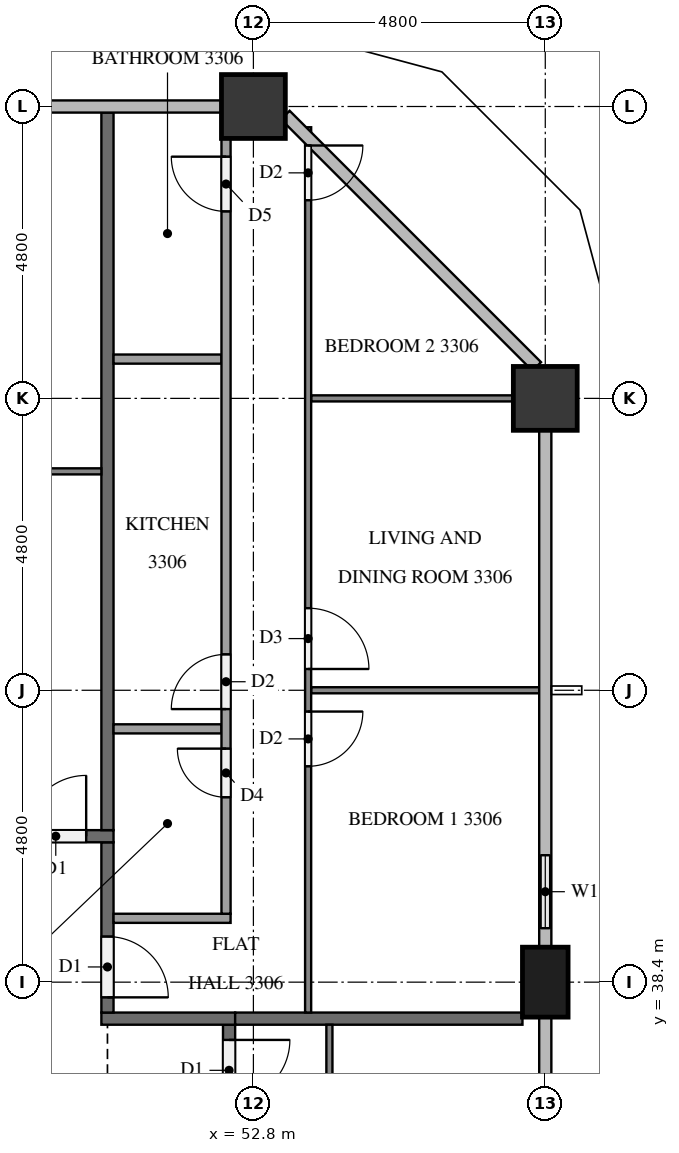
"""IFC4 building model, lengths in metres.
Left out: names, types, materials, properties, quantities, classifications, styles, units other than length and angle.
Written with IfcOpenShell. Run it as: python <this file> out.ifc"""

import sys

from ifc_helpers import new_model, si_unit, direction, frame, frame_2d, origin, origin_2d, place, context, subcontext, project, spatial, rectangle, extrude, element, fill, save


model = new_model("IFC4")
c1 = context("Model", 3, precision=1e-05, world=origin(), true_north=direction((0.0, 1.0)))
c2 = subcontext(c1, "Body", "Model", "MODEL_VIEW")
j1 = project(units=[si_unit("LENGTHUNIT", "METRE"), si_unit("PLANEANGLEUNIT", "RADIAN")], contexts=[c1])
p1 = place(None, origin())
s1 = spatial("IfcSite", under=j1, at=p1, CompositionType="ELEMENT")
p2 = place(p1, origin())
s2 = spatial("IfcBuilding", under=s1, at=p2, CompositionType="ELEMENT")
p3 = place(p2, frame((0.0, 0.0, 129.6)))
s3 = spatial("IfcBuildingStorey", under=s2, at=p3, CompositionType="ELEMENT", Elevation=129.6)
p4 = place(p3, frame((57.6, 38.4, 0.0), z_axis=(0.0, 0.0, 1.0), x_axis=(0.0, 1.0, 0.0)))
e1 = element("IfcColumn", 1, at=p4, inside=s3, PredefinedType="COLUMN", context=c2, shape_type="SweptSolid", body=[
    extrude(rectangle(XDim=1.15, YDim=0.75, at=origin_2d()), origin(), (0.0, 0.0, 1.0), 3.2),
])
for number, where, z_axis, x_axis in (
    (2, (57.6, 48.0, 0.0), (0.0, 0.0, 1.0), (1.0, 0.0, 0.0)),
    (3, (52.8, 52.8, 0.0), (0.0, 0.0, 1.0), (1.0, 0.0, 0.0)),
):
    element("IfcColumn", number, at=place(p3, frame(where, z_axis=z_axis, x_axis=x_axis)), inside=s3, PredefinedType="COLUMN", context=c2, shape_type="SweptSolid", body=[
        extrude(rectangle(XDim=1.05, YDim=1.05, at=origin_2d()), origin(), (0.0, 0.0, 1.0), 3.2),
    ])
p5 = place(p3, frame((57.6, 38.975, 0.0), z_axis=(0.0, 0.0, 1.0), x_axis=(0.0, 1.0, 0.0)))
e4 = element("IfcWall", 4, at=p5, inside=s3, PredefinedType="SOLIDWALL", context=c2, shape_type="SweptSolid", body=[
    extrude(rectangle(XDim=1.825, YDim=0.15, at=frame_2d((0.913, 0.0))), origin(), (0.0, 0.0, 1.0), 3.2),
])
p6 = place(p5, frame((0.312, 0.0, 0.9)))
e5 = element("IfcOpeningElement", 5, at=p6, cuts=e4, PredefinedType="OPENING", context=c2, shape_type="SweptSolid", body=[
    extrude(rectangle(XDim=1.2, YDim=1.4, at=frame_2d((0.6, 0.7))), frame((0.0, 0.085, 0.0), z_axis=(0.0, -1.0, 0.0), x_axis=(1.0, 0.0, 0.0)), (0.0, 0.0, 1.0), 0.17),
])
p7 = place(p3, frame((52.4, 37.7, 0.0), z_axis=(0.0, 0.0, 1.0), x_axis=(0.0, -1.0, 0.0)))
e6 = element("IfcWall", 6, at=p7, inside=s3, PredefinedType="PARTITIONING", context=c2, shape_type="SweptSolid", body=[
    extrude(rectangle(XDim=22.6, YDim=0.2, at=frame_2d((11.3, 0.0))), origin(), (0.0, 0.0, 1.0), 3.2),
])
p8 = place(p7, frame((0.25, 0.0, 0.0)))
e7 = element("IfcOpeningElement", 7, at=p8, cuts=e6, PredefinedType="OPENING", context=c2, shape_type="SweptSolid", body=[
    extrude(rectangle(XDim=1.0, YDim=2.1, at=frame_2d((0.5, 1.05))), frame((0.0, 0.11, 0.0), z_axis=(0.0, -1.0, 0.0), x_axis=(1.0, 0.0, 0.0)), (0.0, 0.0, 1.0), 0.22),
])
p9 = place(p3, frame((52.5, 37.8, 0.0), z_axis=(0.0, 0.0, 1.0), x_axis=(-1.0, 0.0, 0.0)))
e8 = element("IfcWall", 8, at=p9, inside=s3, PredefinedType="PARTITIONING", context=c2, shape_type="SweptSolid", body=[
    extrude(rectangle(XDim=2.2, YDim=0.2, at=frame_2d((1.1, 0.0))), origin(), (0.0, 0.0, 1.0), 3.2),
])
p10 = place(p3, frame((50.4, 40.7, 0.0), z_axis=(0.0, 0.0, 1.0), x_axis=(0.0, -1.0, 0.0)))
e9 = element("IfcWall", 9, at=p10, inside=s3, PredefinedType="PARTITIONING", context=c2, shape_type="SweptSolid", body=[
    extrude(rectangle(XDim=2.8, YDim=0.2, at=frame_2d((1.4, 0.0))), origin(), (0.0, 0.0, 1.0), 3.2),
])
p11 = place(p10, frame((1.55, 0.0, 0.0)))
e10 = element("IfcOpeningElement", 10, at=p11, cuts=e9, PredefinedType="OPENING", context=c2, shape_type="SweptSolid", body=[
    extrude(rectangle(XDim=1.0, YDim=2.1, at=frame_2d((0.5, 1.05))), frame((0.0, 0.11, 0.0), z_axis=(0.0, -1.0, 0.0), x_axis=(1.0, 0.0, 0.0)), (0.0, 0.0, 1.0), 0.22),
])
p12 = place(p3, frame((11.9, 40.8, 0.0), z_axis=(0.0, 0.0, 1.0), x_axis=(1.0, 0.0, 0.0)))
e11 = element("IfcWall", 11, at=p12, inside=s3, PredefinedType="PARTITIONING", context=c2, shape_type="SweptSolid", body=[
    extrude(rectangle(XDim=38.6, YDim=0.2, at=frame_2d((19.3, 0.0))), origin(), (0.0, 0.0, 1.0), 3.2),
])
p13 = place(p12, frame((37.15, 0.0, 0.0)))
e12 = element("IfcOpeningElement", 12, at=p13, cuts=e11, PredefinedType="OPENING", context=c2, shape_type="SweptSolid", body=[
    extrude(rectangle(XDim=1.0, YDim=2.1, at=frame_2d((0.5, 1.05))), frame((0.0, 0.11, 0.0), z_axis=(0.0, -1.0, 0.0), x_axis=(1.0, 0.0, 0.0)), (0.0, 0.0, 1.0), 0.22),
])
p14 = place(p12, frame((10.05, 0.0, 0.0)))
e13 = element("IfcOpeningElement", 13, at=p14, cuts=e11, PredefinedType="OPENING", context=c2, shape_type="SweptSolid", body=[
    extrude(rectangle(XDim=1.0, YDim=2.1, at=frame_2d((0.5, 1.05))), frame((0.0, 0.11, 0.0), z_axis=(0.0, -1.0, 0.0), x_axis=(1.0, 0.0, 0.0)), (0.0, 0.0, 1.0), 0.22),
])
p15 = place(p12, frame((0.45, 0.0, 0.0)))
e14 = element("IfcOpeningElement", 14, at=p15, cuts=e11, PredefinedType="OPENING", context=c2, shape_type="SweptSolid", body=[
    extrude(rectangle(XDim=1.0, YDim=2.1, at=frame_2d((0.5, 1.05))), frame((0.0, 0.11, 0.0), z_axis=(0.0, -1.0, 0.0), x_axis=(1.0, 0.0, 0.0)), (0.0, 0.0, 1.0), 0.22),
])
p16 = place(p3, frame((52.5, 37.8, 0.0), z_axis=(0.0, 0.0, 1.0), x_axis=(1.0, 0.0, 0.0)))
e15 = element("IfcWall", 15, at=p16, inside=s3, PredefinedType="PARTITIONING", context=c2, shape_type="SweptSolid", body=[
    extrude(rectangle(XDim=4.725, YDim=0.2, at=frame_2d((2.363, 0.0))), origin(), (0.0, 0.0, 1.0), 3.2),
])
p17 = place(p3, frame((50.4, 40.9, 0.0), z_axis=(0.0, 0.0, 1.0), x_axis=(0.0, 1.0, 0.0)))
e16 = element("IfcWall", 16, at=p17, inside=s3, PredefinedType="PARTITIONING", context=c2, shape_type="SweptSolid", body=[
    extrude(rectangle(XDim=11.8, YDim=0.2, at=frame_2d((5.9, 0.0))), origin(), (0.0, 0.0, 1.0), 3.2),
])
p18 = place(p3, frame((54.05, 37.7, 0.0), z_axis=(0.0, 0.0, 1.0), x_axis=(0.0, -1.0, 0.0)))
e17 = element("IfcWall", 17, at=p18, inside=s3, PredefinedType="PARTITIONING", context=c2, shape_type="SweptSolid", body=[
    extrude(rectangle(XDim=22.6, YDim=0.1, at=frame_2d((11.3, 0.0))), origin(), (0.0, 0.0, 1.0), 3.2),
])
p19 = place(p18, frame((2.85, 0.0, 0.0)))
e18 = element("IfcOpeningElement", 18, at=p19, cuts=e17, PredefinedType="OPENING", context=c2, shape_type="SweptSolid", body=[
    extrude(rectangle(XDim=0.9, YDim=2.1, at=frame_2d((0.45, 1.05))), frame((0.0, 0.06, 0.0), z_axis=(0.0, -1.0, 0.0), x_axis=(1.0, 0.0, 0.0)), (0.0, 0.0, 1.0), 0.12),
])
p20 = place(p18, frame((4.45, 0.0, 0.0)))
e19 = element("IfcOpeningElement", 19, at=p20, cuts=e17, PredefinedType="OPENING", context=c2, shape_type="SweptSolid", body=[
    extrude(rectangle(XDim=0.8, YDim=2.1, at=frame_2d((0.4, 1.05))), frame((0.0, 0.06, 0.0), z_axis=(0.0, -1.0, 0.0), x_axis=(1.0, 0.0, 0.0)), (0.0, 0.0, 1.0), 0.12),
])
p21 = place(p18, frame((10.05, 0.0, 0.0)))
e20 = element("IfcOpeningElement", 20, at=p21, cuts=e17, PredefinedType="OPENING", context=c2, shape_type="SweptSolid", body=[
    extrude(rectangle(XDim=0.9, YDim=2.1, at=frame_2d((0.45, 1.05))), frame((0.0, 0.06, 0.0), z_axis=(0.0, -1.0, 0.0), x_axis=(1.0, 0.0, 0.0)), (0.0, 0.0, 1.0), 0.12),
])
p22 = place(p18, frame((11.65, 0.0, 0.0)))
e21 = element("IfcOpeningElement", 21, at=p22, cuts=e17, PredefinedType="OPENING", context=c2, shape_type="SweptSolid", body=[
    extrude(rectangle(XDim=0.9, YDim=2.1, at=frame_2d((0.45, 1.05))), frame((0.0, 0.06, 0.0), z_axis=(0.0, -1.0, 0.0), x_axis=(1.0, 0.0, 0.0)), (0.0, 0.0, 1.0), 0.12),
])
p23 = place(p18, frame((19.55, 0.0, 0.0)))
e22 = element("IfcOpeningElement", 22, at=p23, cuts=e17, PredefinedType="OPENING", context=c2, shape_type="SweptSolid", body=[
    extrude(rectangle(XDim=1.0, YDim=2.1, at=frame_2d((0.5, 1.05))), frame((0.0, 0.06, 0.0), z_axis=(0.0, -1.0, 0.0), x_axis=(1.0, 0.0, 0.0)), (0.0, 0.0, 1.0), 0.12),
])
p24 = place(p18, frame((21.25, 0.0, 0.0)))
e23 = element("IfcOpeningElement", 23, at=p24, cuts=e17, PredefinedType="OPENING", context=c2, shape_type="SweptSolid", body=[
    extrude(rectangle(XDim=0.9, YDim=2.1, at=frame_2d((0.45, 1.05))), frame((0.0, 0.06, 0.0), z_axis=(0.0, -1.0, 0.0), x_axis=(1.0, 0.0, 0.0)), (0.0, 0.0, 1.0), 0.12),
])
p25 = place(p3, frame((53.75, 43.2, 0.0), z_axis=(0.0, 0.0, 1.0), x_axis=(1.0, 0.0, 0.0)))
e24 = element("IfcWall", 24, at=p25, inside=s3, PredefinedType="PARTITIONING", context=c2, shape_type="SweptSolid", body=[
    extrude(rectangle(XDim=3.75, YDim=0.1, at=frame_2d((1.875, 0.0))), origin(), (0.0, 0.0, 1.0), 3.2),
])
p26 = place(p3, frame((53.75, 48.0, 0.0), z_axis=(0.0, 0.0, 1.0), x_axis=(1.0, 0.0, 0.0)))
e25 = element("IfcWall", 25, at=p26, inside=s3, PredefinedType="PARTITIONING", context=c2, shape_type="SweptSolid", body=[
    extrude(rectangle(XDim=3.325, YDim=0.1, at=frame_2d((1.663, 0.0))), origin(), (0.0, 0.0, 1.0), 3.2),
])
p27 = place(p3, frame((53.7, 52.459, 0.0), z_axis=(0.0, 0.0, 1.0), x_axis=(0.0, -1.0, 0.0)))
e26 = element("IfcWall", 26, at=p27, inside=s3, PredefinedType="PARTITIONING", context=c2, shape_type="SweptSolid", body=[
    extrude(rectangle(XDim=14.559, YDim=0.1, at=frame_2d((7.279, 0.0))), origin(), (0.0, 0.0, 1.0), 3.2),
])
p28 = place(p27, frame((9.609, 0.0, 0.0)))
e27 = element("IfcOpeningElement", 27, at=p28, cuts=e26, PredefinedType="OPENING", context=c2, shape_type="SweptSolid", body=[
    extrude(rectangle(XDim=0.9, YDim=2.1, at=frame_2d((0.45, 1.05))), frame((0.0, 0.06, 0.0), z_axis=(0.0, -1.0, 0.0), x_axis=(1.0, 0.0, 0.0)), (0.0, 0.0, 1.0), 0.12),
])
p29 = place(p27, frame((7.909, 0.0, 0.0)))
e28 = element("IfcOpeningElement", 28, at=p29, cuts=e26, PredefinedType="OPENING", context=c2, shape_type="SweptSolid", body=[
    extrude(rectangle(XDim=1.0, YDim=2.1, at=frame_2d((0.5, 1.05))), frame((0.0, 0.06, 0.0), z_axis=(0.0, -1.0, 0.0), x_axis=(1.0, 0.0, 0.0)), (0.0, 0.0, 1.0), 0.12),
])
p30 = place(p27, frame((0.3, 0.0, 0.0)))
e29 = element("IfcOpeningElement", 29, at=p30, cuts=e26, PredefinedType="OPENING", context=c2, shape_type="SweptSolid", body=[
    extrude(rectangle(XDim=0.9, YDim=2.1, at=frame_2d((0.45, 1.05))), frame((0.0, 0.06, 0.0), z_axis=(0.0, -1.0, 0.0), x_axis=(1.0, 0.0, 0.0)), (0.0, 0.0, 1.0), 0.12),
])
for number, where, z_axis, x_axis in (
    (30, (50.5, 42.565, 0.0), (0.0, 0.0, 1.0), (1.0, 0.0, 0.0)),
    (31, (50.5, 48.646, 0.0), (0.0, 0.0, 1.0), (1.0, 0.0, 0.0)),
):
    element("IfcWall", number, at=place(p3, frame(where, z_axis=z_axis, x_axis=x_axis)), inside=s3, PredefinedType="PARTITIONING", context=c2, shape_type="SweptSolid", body=[
        extrude(rectangle(XDim=1.775, YDim=0.15, at=frame_2d((0.887, 0.0))), origin(), (0.0, 0.0, 1.0), 3.2),
    ])
p31 = place(p3, frame((50.5, 39.45, 0.0), z_axis=(0.0, 0.0, 1.0), x_axis=(1.0, 0.0, 0.0)))
e32 = element("IfcWall", 32, at=p31, inside=s3, PredefinedType="PARTITIONING", context=c2, shape_type="SweptSolid", body=[
    extrude(rectangle(XDim=1.925, YDim=0.15, at=frame_2d((0.962, 0.0))), origin(), (0.0, 0.0, 1.0), 3.2),
])
p32 = place(p3, frame((52.35, 39.525, 0.0), z_axis=(0.0, 0.0, 1.0), x_axis=(0.0, 1.0, 0.0)))
e33 = element("IfcWall", 33, at=p32, inside=s3, PredefinedType="PARTITIONING", context=c2, shape_type="SweptSolid", body=[
    extrude(rectangle(XDim=12.75, YDim=0.15, at=frame_2d((6.375, 0.0))), origin(), (0.0, 0.0, 1.0), 3.2),
])
p33 = place(p32, frame((1.915, 0.0, 0.0)))
e34 = element("IfcOpeningElement", 34, at=p33, cuts=e33, PredefinedType="OPENING", context=c2, shape_type="SweptSolid", body=[
    extrude(rectangle(XDim=0.8, YDim=2.1, at=frame_2d((0.4, 1.05))), frame((0.0, 0.085, 0.0), z_axis=(0.0, -1.0, 0.0), x_axis=(1.0, 0.0, 0.0)), (0.0, 0.0, 1.0), 0.17),
])
p34 = place(p32, frame((3.365, 0.0, 0.0)))
e35 = element("IfcOpeningElement", 35, at=p34, cuts=e33, PredefinedType="OPENING", context=c2, shape_type="SweptSolid", body=[
    extrude(rectangle(XDim=0.9, YDim=2.1, at=frame_2d((0.45, 1.05))), frame((0.0, 0.085, 0.0), z_axis=(0.0, -1.0, 0.0), x_axis=(1.0, 0.0, 0.0)), (0.0, 0.0, 1.0), 0.17),
])
p35 = place(p32, frame((11.55, 0.0, 0.0)))
e36 = element("IfcOpeningElement", 36, at=p35, cuts=e33, PredefinedType="OPENING", context=c2, shape_type="SweptSolid", body=[
    extrude(rectangle(XDim=0.9, YDim=2.1, at=frame_2d((0.45, 1.05))), frame((0.0, 0.085, 0.0), z_axis=(0.0, -1.0, 0.0), x_axis=(1.0, 0.0, 0.0)), (0.0, 0.0, 1.0), 0.17),
])
p36 = place(p3, frame((36.1, 46.8, 0.0), z_axis=(0.0, 0.0, 1.0), x_axis=(1.0, 0.0, 0.0)))
e37 = element("IfcWall", 37, at=p36, inside=s3, PredefinedType="PARTITIONING", context=c2, shape_type="SweptSolid", body=[
    extrude(rectangle(XDim=14.2, YDim=0.1, at=frame_2d((7.1, 0.0))), origin(), (0.0, 0.0, 1.0), 3.2),
])
p37 = place(p36, frame((9.85, 0.0, 0.0)))
e38 = element("IfcOpeningElement", 38, at=p37, cuts=e37, PredefinedType="OPENING", context=c2, shape_type="SweptSolid", body=[
    extrude(rectangle(XDim=0.9, YDim=2.1, at=frame_2d((0.45, 1.05))), frame((0.0, 0.06, 0.0), z_axis=(0.0, -1.0, 0.0), x_axis=(1.0, 0.0, 0.0)), (0.0, 0.0, 1.0), 0.12),
])
p38 = place(p36, frame((8.15, 0.0, 0.0)))
e39 = element("IfcOpeningElement", 39, at=p38, cuts=e37, PredefinedType="OPENING", context=c2, shape_type="SweptSolid", body=[
    extrude(rectangle(XDim=1.0, YDim=2.1, at=frame_2d((0.5, 1.05))), frame((0.0, 0.06, 0.0), z_axis=(0.0, -1.0, 0.0), x_axis=(1.0, 0.0, 0.0)), (0.0, 0.0, 1.0), 0.12),
])
p39 = place(p36, frame((0.3, 0.0, 0.0)))
e40 = element("IfcOpeningElement", 40, at=p39, cuts=e37, PredefinedType="OPENING", context=c2, shape_type="SweptSolid", body=[
    extrude(rectangle(XDim=0.9, YDim=2.1, at=frame_2d((0.45, 1.05))), frame((0.0, 0.06, 0.0), z_axis=(0.0, -1.0, 0.0), x_axis=(1.0, 0.0, 0.0)), (0.0, 0.0, 1.0), 0.12),
])
p40 = place(p6, origin())
e41 = element("IfcWindow", 41, at=p40, inside=s3, PartitioningType="SINGLE_PANEL", PredefinedType="WINDOW", context=c2, shape_type="SweptSolid", body=[
    extrude(rectangle(XDim=1.2, YDim=1.4, at=frame_2d((0.6, 0.7))), frame((0.0, 0.03, 0.0), z_axis=(0.0, -1.0, 0.0), x_axis=(1.0, 0.0, 0.0)), (0.0, 0.0, 1.0), 0.06),
])
fill(e5, e41)
p41 = place(p8, origin())
e42 = element("IfcDoor", 42, at=p41, inside=s3, OperationType="SINGLE_SWING_LEFT", PredefinedType="DOOR", context=c2, shape_type="SweptSolid", body=[
    extrude(rectangle(XDim=1.0, YDim=2.1, at=frame_2d((0.5, 1.05))), frame((0.0, 0.025, 0.0), z_axis=(0.0, -1.0, 0.0), x_axis=(1.0, 0.0, 0.0)), (0.0, 0.0, 1.0), 0.05),
])
fill(e7, e42)
p42 = place(p11, origin())
e43 = element("IfcDoor", 43, at=p42, inside=s3, OperationType="SINGLE_SWING_RIGHT", PredefinedType="DOOR", context=c2, shape_type="SweptSolid", body=[
    extrude(rectangle(XDim=1.0, YDim=2.1, at=frame_2d((0.5, 1.05))), frame((0.0, 0.025, 0.0), z_axis=(0.0, -1.0, 0.0), x_axis=(1.0, 0.0, 0.0)), (0.0, 0.0, 1.0), 0.05),
])
fill(e10, e43)
p43 = place(p13, origin())
e44 = element("IfcDoor", 44, at=p43, inside=s3, OperationType="SINGLE_SWING_RIGHT", PredefinedType="DOOR", context=c2, shape_type="SweptSolid", body=[
    extrude(rectangle(XDim=1.0, YDim=2.1, at=frame_2d((0.5, 1.05))), frame((0.0, 0.025, 0.0), z_axis=(0.0, -1.0, 0.0), x_axis=(1.0, 0.0, 0.0)), (0.0, 0.0, 1.0), 0.05),
])
fill(e12, e44)
p44 = place(p28, origin())
e45 = element("IfcDoor", 45, at=p44, inside=s3, OperationType="SINGLE_SWING_LEFT", PredefinedType="DOOR", context=c2, shape_type="SweptSolid", body=[
    extrude(rectangle(XDim=0.9, YDim=2.1, at=frame_2d((0.45, 1.05))), frame((0.0, 0.025, 0.0), z_axis=(0.0, -1.0, 0.0), x_axis=(1.0, 0.0, 0.0)), (0.0, 0.0, 1.0), 0.05),
])
fill(e27, e45)
p45 = place(p29, origin())
e46 = element("IfcDoor", 46, at=p45, inside=s3, OperationType="SINGLE_SWING_RIGHT", PredefinedType="DOOR", context=c2, shape_type="SweptSolid", body=[
    extrude(rectangle(XDim=1.0, YDim=2.1, at=frame_2d((0.5, 1.05))), frame((0.0, 0.025, 0.0), z_axis=(0.0, -1.0, 0.0), x_axis=(1.0, 0.0, 0.0)), (0.0, 0.0, 1.0), 0.05),
])
fill(e28, e46)
p46 = place(p30, origin())
e47 = element("IfcDoor", 47, at=p46, inside=s3, OperationType="SINGLE_SWING_LEFT", PredefinedType="DOOR", context=c2, shape_type="SweptSolid", body=[
    extrude(rectangle(XDim=0.9, YDim=2.1, at=frame_2d((0.45, 1.05))), frame((0.0, 0.025, 0.0), z_axis=(0.0, -1.0, 0.0), x_axis=(1.0, 0.0, 0.0)), (0.0, 0.0, 1.0), 0.05),
])
fill(e29, e47)
p47 = place(p33, origin())
e48 = element("IfcDoor", 48, at=p47, inside=s3, OperationType="SINGLE_SWING_RIGHT", PredefinedType="DOOR", context=c2, shape_type="SweptSolid", body=[
    extrude(rectangle(XDim=0.8, YDim=2.1, at=frame_2d((0.4, 1.05))), frame((0.0, 0.025, 0.0), z_axis=(0.0, -1.0, 0.0), x_axis=(1.0, 0.0, 0.0)), (0.0, 0.0, 1.0), 0.05),
])
fill(e34, e48)
p48 = place(p34, origin())
e49 = element("IfcDoor", 49, at=p48, inside=s3, OperationType="SINGLE_SWING_LEFT", PredefinedType="DOOR", context=c2, shape_type="SweptSolid", body=[
    extrude(rectangle(XDim=0.9, YDim=2.1, at=frame_2d((0.45, 1.05))), frame((0.0, 0.025, 0.0), z_axis=(0.0, -1.0, 0.0), x_axis=(1.0, 0.0, 0.0)), (0.0, 0.0, 1.0), 0.05),
])
fill(e35, e49)
p49 = place(p35, origin())
e50 = element("IfcDoor", 50, at=p49, inside=s3, OperationType="SINGLE_SWING_RIGHT", PredefinedType="DOOR", context=c2, shape_type="SweptSolid", body=[
    extrude(rectangle(XDim=0.9, YDim=2.1, at=frame_2d((0.45, 1.05))), frame((0.0, 0.025, 0.0), z_axis=(0.0, -1.0, 0.0), x_axis=(1.0, 0.0, 0.0)), (0.0, 0.0, 1.0), 0.05),
])
fill(e36, e50)
save(model, sys.argv[1])
